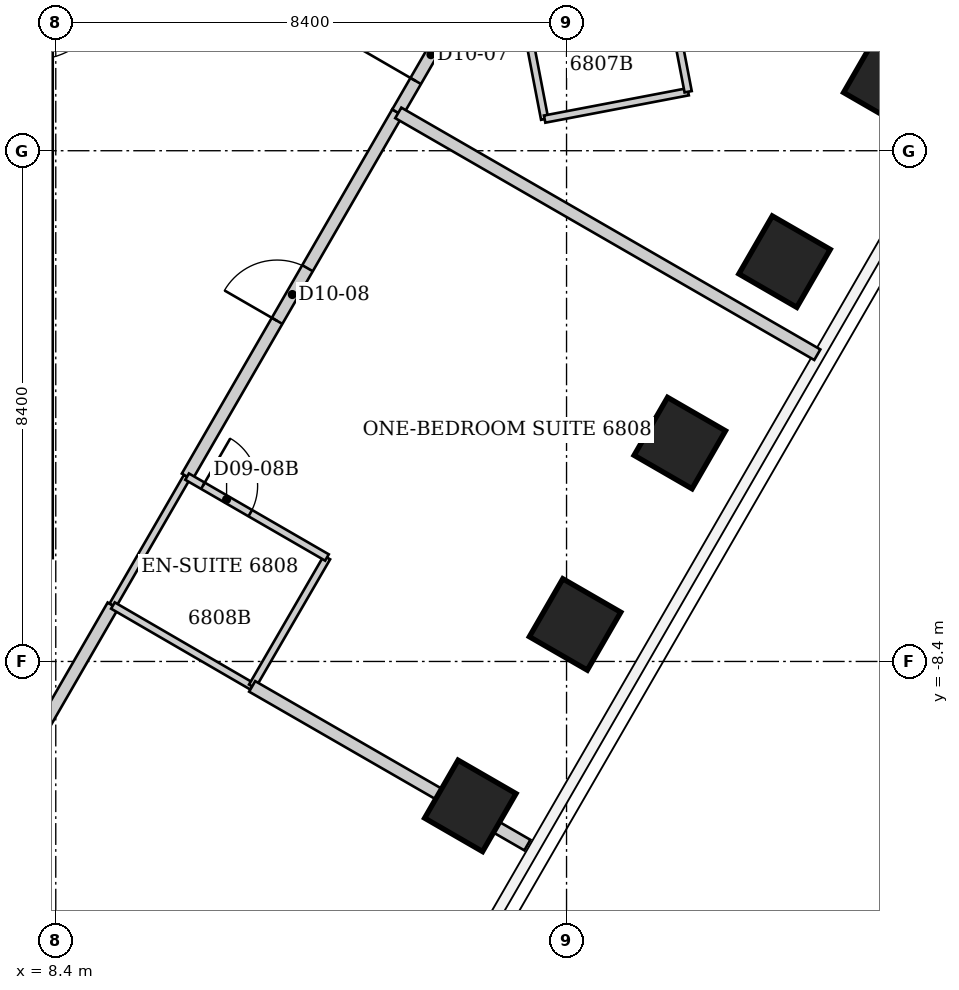
"""IFC4 building model, lengths in metres.
Left out: names, types, materials, properties, quantities, classifications, styles, units other than length and angle.
Written with IfcOpenShell. Run it as: python <this file> out.ifc"""

import sys

from ifc_helpers import new_model, si_unit, direction, frame, frame_2d, origin, origin_2d, place, context, subcontext, project, spatial, rectangle, extrude, element, fill, save


model = new_model("IFC4")
c1 = context("Model", 3, precision=1e-05, world=origin(), true_north=direction((0.0, 1.0)))
c2 = subcontext(c1, "Body", "Model", "MODEL_VIEW")
j1 = project(units=[si_unit("LENGTHUNIT", "METRE"), si_unit("PLANEANGLEUNIT", "RADIAN")], contexts=[c1])
p1 = place(None, origin())
s1 = spatial("IfcSite", under=j1, at=p1, CompositionType="ELEMENT")
p2 = place(p1, origin())
s2 = spatial("IfcBuilding", under=s1, at=p2, CompositionType="ELEMENT")
p3 = place(p2, frame((0.0, 0.0, 272.2)))
s3 = spatial("IfcBuildingStorey", under=s2, at=p3, CompositionType="ELEMENT", Elevation=272.2)
for number, where, z_axis, x_axis in (
    (1, (22.108, 1.159, 0.0), (0.0, 0.0, 1.0), (0.866, -0.5, 0.0)),
    (2, (20.385, -1.824, 0.0), (0.0, 0.0, 1.0), (0.866, -0.5, 0.0)),
    (3, (18.663, -4.808, 0.0), (0.0, 0.0, 1.0), (0.866, -0.5, 0.0)),
    (4, (16.94, -7.792, 0.0), (0.0, 0.0, 1.0), (0.866, -0.5, 0.0)),
    (5, (15.218, -10.775, 0.0), (0.0, 0.0, 1.0), (0.866, -0.5, 0.0)),
):
    element("IfcColumn", number, at=place(p3, frame(where, z_axis=z_axis, x_axis=x_axis)), inside=s3, PredefinedType="COLUMN", context=c2, shape_type="SweptSolid", body=[
        extrude(rectangle(XDim=1.1, YDim=1.1, at=origin_2d()), origin(), (0.0, 0.0, 1.0), 3.8),
    ])
p4 = place(p3, frame((-8.35, -6.4, 0.0), z_axis=(0.0, 0.0, 1.0), x_axis=(1.0, 0.0, 0.0)))
e6 = element("IfcWall", 6, at=p4, inside=s3, PredefinedType="SHEAR", context=c2, shape_type="SweptSolid", body=[
    extrude(rectangle(XDim=16.7, YDim=0.6, at=frame_2d((8.35, 0.0))), origin(), (0.0, 0.0, 1.0), 3.8),
])
p5 = place(p3, frame((8.05, -6.1, 0.0), z_axis=(0.0, 0.0, 1.0), x_axis=(0.0, 1.0, 0.0)))
e7 = element("IfcWall", 7, at=p5, inside=s3, PredefinedType="SHEAR", context=c2, shape_type="SweptSolid", body=[
    extrude(rectangle(XDim=12.2, YDim=0.6, at=frame_2d((6.1, 0.0))), origin(), (0.0, 0.0, 1.0), 3.8),
])
p6 = place(p5, frame((7.6, 0.0, 0.0)))
e8 = element("IfcOpeningElement", 8, at=p6, cuts=e7, PredefinedType="OPENING", context=c2, shape_type="SweptSolid", body=[
    extrude(rectangle(XDim=1.2, YDim=2.2, at=frame_2d((0.6, 1.1))), frame((0.0, 0.3, 0.0), z_axis=(0.0, -1.0, 0.0), x_axis=(1.0, 0.0, 0.0)), (0.0, 0.0, 1.0), 0.6),
])
p7 = place(p3, frame((6.34, -12.68, 0.0), z_axis=(0.0, 0.0, 1.0), x_axis=(0.499725974117, 0.866183554908, 0.0)))
e9 = element("IfcWall", 9, at=p7, inside=s3, PredefinedType="PARTITIONING", context=c2, shape_type="SweptSolid", body=[
    extrude(rectangle(XDim=6.003, YDim=0.2, at=frame_2d((3.001, 0.0))), origin(), (0.0, 0.0, 1.0), 3.64),
])
p8 = place(p7, frame((2.502, 0.0, 0.0)))
e10 = element("IfcOpeningElement", 10, at=p8, cuts=e9, PredefinedType="OPENING", context=c2, shape_type="SweptSolid", body=[
    extrude(rectangle(XDim=1.0, YDim=2.13, at=frame_2d((0.5, 1.065))), frame((0.0, 0.1, 0.0), z_axis=(0.0, -1.0, 0.0), x_axis=(1.0, 0.0, 0.0)), (0.0, 0.0, 1.0), 0.2),
])
p9 = place(p3, frame((9.337, -7.478, 0.0), z_axis=(0.0, 0.0, 1.0), x_axis=(0.500186129468, 0.865917915214, 0.0)))
e11 = element("IfcWall", 11, at=p9, inside=s3, PredefinedType="PARTITIONING", context=c2, shape_type="SweptSolid", body=[
    extrude(rectangle(XDim=2.446, YDim=0.12, at=frame_2d((1.223, 0.0))), origin(), (0.0, 0.0, 1.0), 3.64),
])
p10 = place(p3, frame((9.34, -7.48, 0.0), z_axis=(0.0, 0.0, 1.0), x_axis=(0.864703697948, -0.502282305835, 0.0)))
e12 = element("IfcWall", 12, at=p10, inside=s3, PredefinedType="PARTITIONING", context=c2, shape_type="SweptSolid", body=[
    extrude(rectangle(XDim=2.648, YDim=0.12, at=frame_2d((1.324, 0.0))), origin(), (0.0, 0.0, 1.0), 3.038),
])
p11 = place(p3, frame((10.56, -5.36, 0.0), z_axis=(0.0, 0.0, 1.0), x_axis=(0.500162347976, 0.865931651845, 0.0)))
e13 = element("IfcWall", 13, at=p11, inside=s3, PredefinedType="PARTITIONING", context=c2, shape_type="SweptSolid", body=[
    extrude(rectangle(XDim=6.918, YDim=0.2, at=frame_2d((3.459, 0.0))), origin(), (0.0, 0.0, 1.0), 3.64),
])
p12 = place(p11, frame((2.959, 0.0, 0.0)))
e14 = element("IfcOpeningElement", 14, at=p12, cuts=e13, PredefinedType="OPENING", context=c2, shape_type="SweptSolid", body=[
    extrude(rectangle(XDim=1.0, YDim=2.13, at=frame_2d((0.5, 1.065))), frame((0.0, 0.1, 0.0), z_axis=(0.0, -1.0, 0.0), x_axis=(1.0, 0.0, 0.0)), (0.0, 0.0, 1.0), 0.2),
])
p13 = place(p3, frame((11.63, -8.81, 0.0), z_axis=(0.0, 0.0, 1.0), x_axis=(0.501888006485, 0.864932615264, 0.0)))
e15 = element("IfcWall", 15, at=p13, inside=s3, PredefinedType="PARTITIONING", context=c2, shape_type="SweptSolid", body=[
    extrude(rectangle(XDim=2.451, YDim=0.12, at=frame_2d((1.226, 0.0))), origin(), (0.0, 0.0, 1.0), 3.64),
])
p14 = place(p3, frame((12.86, -6.69, 0.0), z_axis=(0.0, 0.0, 1.0), x_axis=(-0.865675724273, 0.500605174168, 0.0)))
e16 = element("IfcWall", 16, at=p14, inside=s3, PredefinedType="PARTITIONING", context=c2, shape_type="SweptSolid", body=[
    extrude(rectangle(XDim=2.657, YDim=0.12, at=frame_2d((1.329, 0.0))), origin(), (0.0, 0.0, 1.0), 3.64),
])
p15 = place(p14, frame((1.457, 0.0, 0.0)))
e17 = element("IfcOpeningElement", 17, at=p15, cuts=e16, PredefinedType="OPENING", context=c2, shape_type="SweptSolid", body=[
    extrude(rectangle(XDim=0.9, YDim=2.03, at=frame_2d((0.45, 1.015))), frame((0.0, 0.06, 0.0), z_axis=(0.0, -1.0, 0.0), x_axis=(1.0, 0.0, 0.0)), (0.0, 0.0, 1.0), 0.12),
])
p16 = place(p3, frame((14.02, 0.63, 0.0), z_axis=(0.0, 0.0, 1.0), x_axis=(0.500957366999, 0.865471961677, 0.0)))
e18 = element("IfcWall", 18, at=p16, inside=s3, PredefinedType="PARTITIONING", context=c2, shape_type="SweptSolid", body=[
    extrude(rectangle(XDim=2.196, YDim=0.2, at=frame_2d((1.098, 0.0))), origin(), (0.0, 0.0, 1.0), 3.64),
])
p17 = place(p16, frame((0.598, 0.0, 0.0)))
e19 = element("IfcOpeningElement", 19, at=p17, cuts=e18, PredefinedType="OPENING", context=c2, shape_type="SweptSolid", body=[
    extrude(rectangle(XDim=1.0, YDim=2.13, at=frame_2d((0.5, 1.065))), frame((0.0, 0.1, 0.0), z_axis=(0.0, -1.0, 0.0), x_axis=(1.0, 0.0, 0.0)), (0.0, 0.0, 1.0), 0.2),
])
p18 = place(p3, frame((15.95, 3.07, 0.0), z_axis=(0.0, 0.0, 1.0), x_axis=(0.188697442844, -0.982035271802, 0.0)))
e20 = element("IfcWall", 20, at=p18, inside=s3, PredefinedType="PARTITIONING", context=c2, shape_type="SweptSolid", body=[
    extrude(rectangle(XDim=2.597, YDim=0.12, at=frame_2d((1.298, 0.0))), origin(), (0.0, 0.0, 1.0), 3.64),
])
p19 = place(p3, frame((16.156, -11.42, 0.0), z_axis=(0.0, 0.0, 1.0), x_axis=(-0.866278144217, 0.499561984995, 0.0)))
e21 = element("IfcWall", 21, at=p19, inside=s3, PredefinedType="PARTITIONING", context=c2, shape_type="SweptSolid", body=[
    extrude(rectangle(XDim=5.225, YDim=0.2, at=frame_2d((2.612, 0.0))), origin(), (0.0, 0.0, 1.0), 3.64),
])
p20 = place(p3, frame((16.44, 0.52, 0.0), z_axis=(0.0, 0.0, 1.0), x_axis=(0.982307423658, 0.187275533444, 0.0)))
e22 = element("IfcWall", 22, at=p20, inside=s3, PredefinedType="PARTITIONING", context=c2, shape_type="SweptSolid", body=[
    extrude(rectangle(XDim=2.403, YDim=0.12, at=frame_2d((1.201, 0.0))), origin(), (0.0, 0.0, 1.0), 3.64),
])
p21 = place(p3, frame((18.8, 0.97, 0.0), z_axis=(0.0, 0.0, 1.0), x_axis=(-0.188697442844, 0.982035271802, 0.0)))
e23 = element("IfcWall", 23, at=p21, inside=s3, PredefinedType="PARTITIONING", context=c2, shape_type="SweptSolid", body=[
    extrude(rectangle(XDim=2.597, YDim=0.12, at=frame_2d((1.298, 0.0))), origin(), (0.0, 0.0, 1.0), 3.64),
])
p22 = place(p21, frame((1.397, 0.0, 0.0)))
e24 = element("IfcOpeningElement", 24, at=p22, cuts=e23, PredefinedType="OPENING", context=c2, shape_type="SweptSolid", body=[
    extrude(rectangle(XDim=0.9, YDim=2.03, at=frame_2d((0.45, 1.015))), frame((0.0, 0.06, 0.0), z_axis=(0.0, -1.0, 0.0), x_axis=(1.0, 0.0, 0.0)), (0.0, 0.0, 1.0), 0.12),
])
p23 = place(p3, frame((20.924, -3.355, 0.0), z_axis=(0.0, 0.0, 1.0), x_axis=(-0.866082379937, 0.499901301422, 0.0)))
e25 = element("IfcWall", 25, at=p23, inside=s3, PredefinedType="PARTITIONING", context=c2, shape_type="SweptSolid", body=[
    extrude(rectangle(XDim=7.957, YDim=0.2, at=frame_2d((3.978, 0.0))), origin(), (0.0, 0.0, 1.0), 3.64),
])
p24 = place(p17, origin())
e26 = element("IfcDoor", 26, at=p24, inside=s3, OperationType="SINGLE_SWING_LEFT", PredefinedType="DOOR", context=c2, shape_type="SweptSolid", body=[
    extrude(rectangle(XDim=1.0, YDim=2.13, at=frame_2d((0.5, 1.065))), frame((0.0, 0.025, 0.0), z_axis=(0.0, -1.0, 0.0), x_axis=(1.0, 0.0, 0.0)), (0.0, 0.0, 1.0), 0.05),
])
fill(e19, e26)
p25 = place(p12, origin())
e27 = element("IfcDoor", 27, at=p25, inside=s3, OperationType="SINGLE_SWING_LEFT", PredefinedType="DOOR", context=c2, shape_type="SweptSolid", body=[
    extrude(rectangle(XDim=1.0, YDim=2.13, at=frame_2d((0.5, 1.065))), frame((0.0, 0.025, 0.0), z_axis=(0.0, -1.0, 0.0), x_axis=(1.0, 0.0, 0.0)), (0.0, 0.0, 1.0), 0.05),
])
fill(e14, e27)
p26 = place(p15, origin())
e28 = element("IfcDoor", 28, at=p26, inside=s3, OperationType="SINGLE_SWING_RIGHT", PredefinedType="DOOR", context=c2, shape_type="SweptSolid", body=[
    extrude(rectangle(XDim=0.9, YDim=2.03, at=frame_2d((0.45, 1.015))), frame((0.0, 0.025, 0.0), z_axis=(0.0, -1.0, 0.0), x_axis=(1.0, 0.0, 0.0)), (0.0, 0.0, 1.0), 0.05),
])
fill(e17, e28)
save(model, sys.argv[1])
